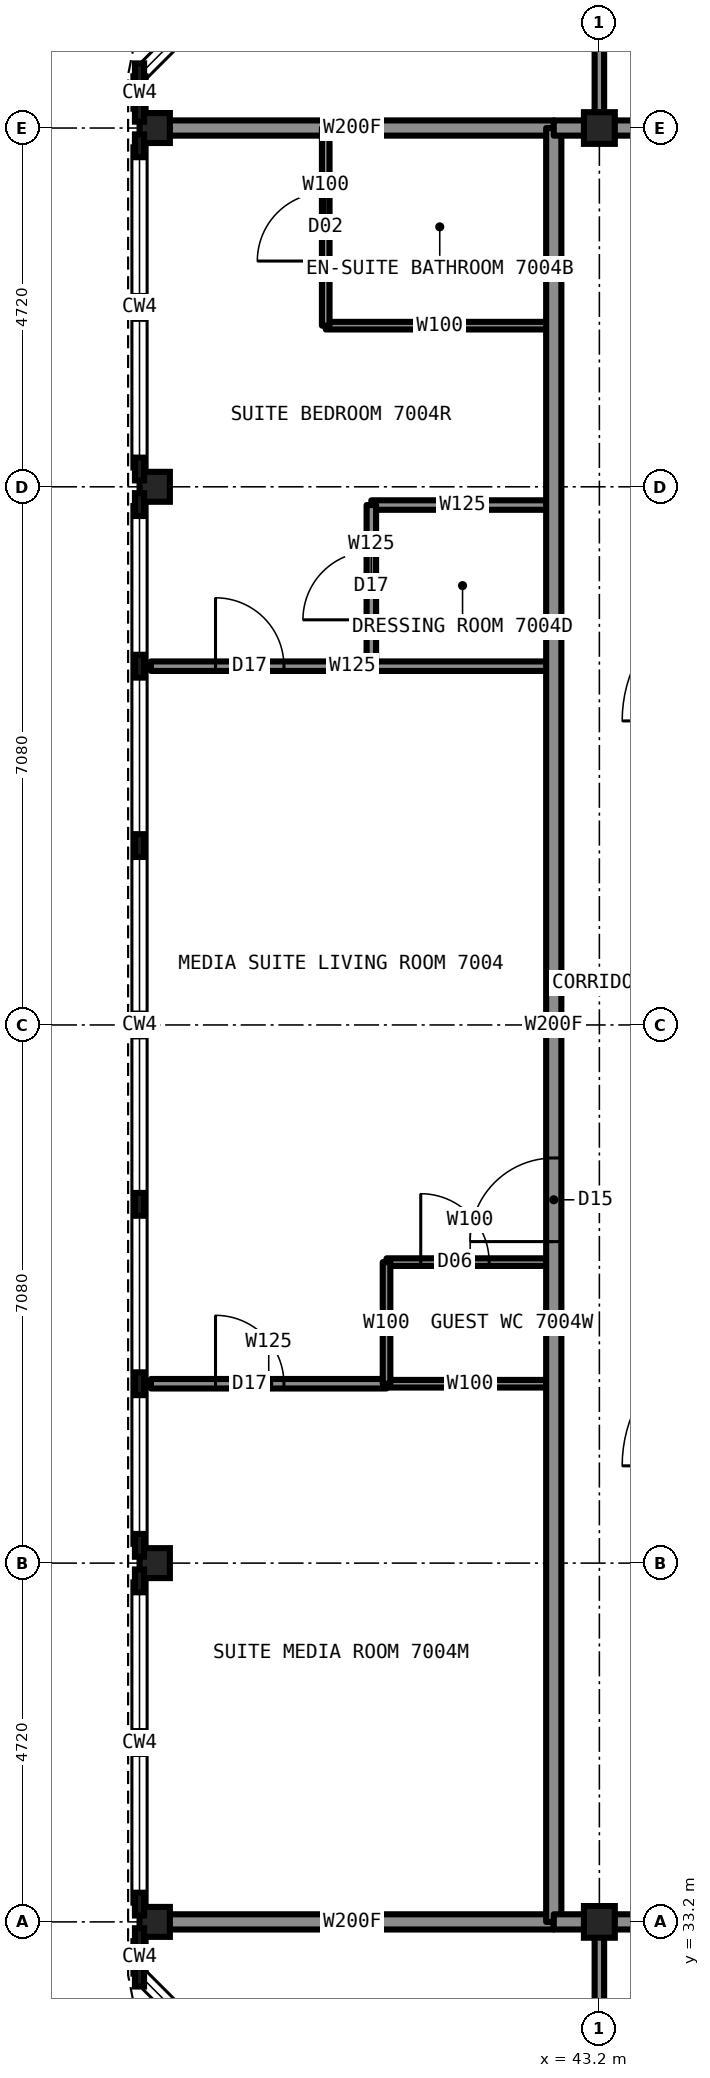
"""IFC4 building model, lengths in metres.
Left out: names, types, materials, properties, quantities, classifications, styles, units other than length and angle.
Written with IfcOpenShell. Run it as: python <this file> out.ifc"""

import sys

from ifc_helpers import new_model, si_unit, direction, frame, frame_2d, origin, origin_2d, place, context, subcontext, project, spatial, rectangle, i_section, extrude, element, fill, save


model = new_model("IFC4")
c1 = context("Model", 3, precision=1e-05, world=origin(), true_north=direction((0.0, 1.0)))
c2 = subcontext(c1, "Body", "Model", "MODEL_VIEW")
j1 = project(units=[si_unit("LENGTHUNIT", "METRE"), si_unit("PLANEANGLEUNIT", "RADIAN")], contexts=[c1])
p1 = place(None, origin())
s1 = spatial("IfcSite", under=j1, at=p1, CompositionType="ELEMENT")
p2 = place(p1, origin())
s2 = spatial("IfcBuilding", under=s1, at=p2, CompositionType="ELEMENT")
p3 = place(p2, frame((0.0, 0.0, 254.7)))
s3 = spatial("IfcBuildingStorey", under=s2, at=p3, CompositionType="ELEMENT", Elevation=254.7)
for number, where, z_axis, x_axis in (
    (1, (37.35, 33.2, 0.0), (0.0, 0.0, 1.0), (1.0, 0.0, 0.0)),
    (2, (37.35, 37.92, 0.0), (0.0, 0.0, 1.0), (1.0, 0.0, 0.0)),
    (3, (37.35, 52.08, 0.0), (0.0, 0.0, 1.0), (1.0, 0.0, 0.0)),
    (4, (37.35, 56.8, 0.0), (0.0, 0.0, 1.0), (1.0, 0.0, 0.0)),
):
    element("IfcColumn", number, at=place(p3, frame(where, z_axis=z_axis, x_axis=x_axis)), inside=s3, PredefinedType="COLUMN", context=c2, shape_type="SweptSolid", body=[
        extrude(i_section(OverallWidth=0.399, OverallDepth=0.394, WebThickness=0.023, FlangeThickness=0.037, at=origin_2d()), origin(), (0.0, 0.0, 1.0), 3.5),
    ])
for number, where, z_axis, x_axis in (
    (5, (43.2, 33.2, 0.0), (0.0, 0.0, 1.0), (1.0, 0.0, 0.0)),
    (6, (43.2, 56.8, 0.0), (0.0, 0.0, 1.0), (1.0, 0.0, 0.0)),
):
    element("IfcColumn", number, at=place(p3, frame(where, z_axis=z_axis, x_axis=x_axis)), inside=s3, PredefinedType="COLUMN", context=c2, shape_type="SweptSolid", body=[
        extrude(i_section(OverallWidth=0.406, OverallDepth=0.417, WebThickness=0.03, FlangeThickness=0.048, at=origin_2d()), origin(), (0.0, 0.0, 1.0), 3.5),
    ])
p4 = place(p3, frame((43.22, 33.2, 0.0), z_axis=(0.0, 0.0, 1.0), x_axis=(1.0, 0.0, 0.0)))
e7 = element("IfcWall", 7, at=p4, inside=s3, PredefinedType="PARTITIONING", context=c2, shape_type="SweptSolid", body=[
    extrude(rectangle(XDim=1.78, YDim=0.2, at=frame_2d((0.89, 0.0))), origin(), (0.0, 0.0, 1.0), 3.33),
])
p5 = place(p3, frame((37.3, 33.2, 0.0), z_axis=(0.0, 0.0, 1.0), x_axis=(1.0, 0.0, 0.0)))
e8 = element("IfcWall", 8, at=p5, inside=s3, PredefinedType="PARTITIONING", context=c2, shape_type="SweptSolid", body=[
    extrude(rectangle(XDim=5.3, YDim=0.2, at=frame_2d((2.65, 0.0))), origin(), (0.0, 0.0, 1.0), 2.573),
])
p6 = place(p3, frame((40.4, 41.88, 0.0), z_axis=(0.0, 0.0, 1.0), x_axis=(1.0, 0.0, 0.0)))
e9 = element("IfcWall", 9, at=p6, inside=s3, PredefinedType="PARTITIONING", context=c2, shape_type="SweptSolid", body=[
    extrude(rectangle(XDim=2.2, YDim=0.1, at=frame_2d((1.1, 0.0))), origin(), (0.0, 0.0, 1.0), 3.33),
])
p7 = place(p6, frame((0.45, 0.0, 0.0)))
e10 = element("IfcOpeningElement", 10, at=p7, cuts=e9, PredefinedType="OPENING", context=c2, shape_type="SweptSolid", body=[
    extrude(rectangle(XDim=0.9, YDim=2.1, at=frame_2d((0.45, 1.05))), frame((0.0, 0.06, 0.0), z_axis=(0.0, -1.0, 0.0), x_axis=(1.0, 0.0, 0.0)), (0.0, 0.0, 1.0), 0.12),
])
p8 = place(p3, frame((40.4, 40.28, 0.0), z_axis=(0.0, 0.0, 1.0), x_axis=(1.0, 0.0, 0.0)))
e11 = element("IfcWall", 11, at=p8, inside=s3, PredefinedType="PARTITIONING", context=c2, shape_type="SweptSolid", body=[
    extrude(rectangle(XDim=2.2, YDim=0.1, at=frame_2d((1.1, 0.0))), origin(), (0.0, 0.0, 1.0), 2.797),
])
p9 = place(p3, frame((37.3, 40.28, 0.0), z_axis=(0.0, 0.0, 1.0), x_axis=(1.0, 0.0, 0.0)))
e12 = element("IfcWall", 12, at=p9, inside=s3, PredefinedType="PARTITIONING", context=c2, shape_type="SweptSolid", body=[
    extrude(rectangle(XDim=3.1, YDim=0.125, at=frame_2d((1.55, 0.0))), origin(), (0.0, 0.0, 1.0), 2.797),
])
p10 = place(p9, frame((0.85, 0.0, 0.0)))
e13 = element("IfcOpeningElement", 13, at=p10, cuts=e12, PredefinedType="OPENING", context=c2, shape_type="SweptSolid", body=[
    extrude(rectangle(XDim=0.9, YDim=2.2, at=frame_2d((0.45, 1.1))), frame((0.0, 0.073, 0.0), z_axis=(0.0, -1.0, 0.0), x_axis=(1.0, 0.0, 0.0)), (0.0, 0.0, 1.0), 0.145),
])
p11 = place(p3, frame((43.22, 56.8, 0.0), z_axis=(0.0, 0.0, 1.0), x_axis=(1.0, 0.0, 0.0)))
e14 = element("IfcWall", 14, at=p11, inside=s3, PredefinedType="PARTITIONING", context=c2, shape_type="SweptSolid", body=[
    extrude(rectangle(XDim=1.78, YDim=0.2, at=frame_2d((0.89, 0.0))), origin(), (0.0, 0.0, 1.0), 3.33),
])
p12 = place(p3, frame((37.3, 56.8, 0.0), z_axis=(0.0, 0.0, 1.0), x_axis=(1.0, 0.0, 0.0)))
e15 = element("IfcWall", 15, at=p12, inside=s3, PredefinedType="PARTITIONING", context=c2, shape_type="SweptSolid", body=[
    extrude(rectangle(XDim=5.3, YDim=0.2, at=frame_2d((2.65, 0.0))), origin(), (0.0, 0.0, 1.0), 2.573),
])
p13 = place(p3, frame((37.3, 49.72, 0.0), z_axis=(0.0, 0.0, 1.0), x_axis=(1.0, 0.0, 0.0)))
e16 = element("IfcWall", 16, at=p13, inside=s3, PredefinedType="PARTITIONING", context=c2, shape_type="SweptSolid", body=[
    extrude(rectangle(XDim=5.3, YDim=0.125, at=frame_2d((2.65, 0.0))), origin(), (0.0, 0.0, 1.0), 2.797),
])
p14 = place(p13, frame((0.85, 0.0, 0.0)))
e17 = element("IfcOpeningElement", 17, at=p14, cuts=e16, PredefinedType="OPENING", context=c2, shape_type="SweptSolid", body=[
    extrude(rectangle(XDim=0.9, YDim=2.2, at=frame_2d((0.45, 1.1))), frame((0.0, 0.073, 0.0), z_axis=(0.0, -1.0, 0.0), x_axis=(1.0, 0.0, 0.0)), (0.0, 0.0, 1.0), 0.145),
])
p15 = place(p3, frame((40.2, 51.84, 0.0), z_axis=(0.0, 0.0, 1.0), x_axis=(1.0, 0.0, 0.0)))
e18 = element("IfcWall", 18, at=p15, inside=s3, PredefinedType="PARTITIONING", context=c2, shape_type="SweptSolid", body=[
    extrude(rectangle(XDim=2.4, YDim=0.125, at=frame_2d((1.2, 0.0))), origin(), (0.0, 0.0, 1.0), 3.33),
])
p16 = place(p3, frame((39.6, 54.2, 0.0), z_axis=(0.0, 0.0, 1.0), x_axis=(1.0, 0.0, 0.0)))
e19 = element("IfcWall", 19, at=p16, inside=s3, PredefinedType="PARTITIONING", context=c2, shape_type="SweptSolid", body=[
    extrude(rectangle(XDim=3.0, YDim=0.1, at=frame_2d((1.5, 0.0))), origin(), (0.0, 0.0, 1.0), 3.33),
])
p17 = place(p3, frame((43.2, 27.3, 0.0), z_axis=(0.0, 0.0, 1.0), x_axis=(0.0, 1.0, 0.0)))
e20 = element("IfcWall", 20, at=p17, inside=s3, PredefinedType="PARTITIONING", context=c2, shape_type="SweptSolid", body=[
    extrude(rectangle(XDim=5.9, YDim=0.125, at=frame_2d((2.95, 0.0))), origin(), (0.0, 0.0, 1.0), 2.573),
])
p18 = place(p17, frame((1.45, 0.0, 0.0)))
e21 = element("IfcOpeningElement", 21, at=p18, cuts=e20, PredefinedType="OPENING", context=c2, shape_type="SweptSolid", body=[
    extrude(rectangle(XDim=0.9, YDim=2.2, at=frame_2d((0.45, 1.1))), frame((0.0, 0.073, 0.0), z_axis=(0.0, -1.0, 0.0), x_axis=(1.0, 0.0, 0.0)), (0.0, 0.0, 1.0), 0.145),
])
p19 = place(p3, frame((43.2, 56.8, 0.0), z_axis=(0.0, 0.0, 1.0), x_axis=(0.0, 1.0, 0.0)))
e22 = element("IfcWall", 22, at=p19, inside=s3, PredefinedType="PARTITIONING", context=c2, shape_type="SweptSolid", body=[
    extrude(rectangle(XDim=5.9, YDim=0.125, at=frame_2d((2.95, 0.0))), origin(), (0.0, 0.0, 1.0), 2.573),
])
p20 = place(p19, frame((3.55, 0.0, 0.0)))
e23 = element("IfcOpeningElement", 23, at=p20, cuts=e22, PredefinedType="OPENING", context=c2, shape_type="SweptSolid", body=[
    extrude(rectangle(XDim=0.9, YDim=2.2, at=frame_2d((0.45, 1.1))), frame((0.0, 0.073, 0.0), z_axis=(0.0, -1.0, 0.0), x_axis=(1.0, 0.0, 0.0)), (0.0, 0.0, 1.0), 0.145),
])
p21 = place(p3, frame((42.6, 33.2, 0.0), z_axis=(0.0, 0.0, 1.0), x_axis=(0.0, 1.0, 0.0)))
e24 = element("IfcWall", 24, at=p21, inside=s3, PredefinedType="PARTITIONING", context=c2, shape_type="SweptSolid", body=[
    extrude(rectangle(XDim=23.6, YDim=0.2, at=frame_2d((11.8, 0.0))), origin(), (0.0, 0.0, 1.0), 3.33),
])
p22 = place(p21, frame((8.95, 0.0, 0.0)))
e25 = element("IfcOpeningElement", 25, at=p22, cuts=e24, PredefinedType="OPENING", context=c2, shape_type="SweptSolid", body=[
    extrude(rectangle(XDim=1.1, YDim=2.2, at=frame_2d((0.55, 1.1))), frame((0.0, 0.11, 0.0), z_axis=(0.0, -1.0, 0.0), x_axis=(1.0, 0.0, 0.0)), (0.0, 0.0, 1.0), 0.22),
])
p23 = place(p3, frame((40.4, 40.28, 0.0), z_axis=(0.0, 0.0, 1.0), x_axis=(0.0, 1.0, 0.0)))
e26 = element("IfcWall", 26, at=p23, inside=s3, PredefinedType="PARTITIONING", context=c2, shape_type="SweptSolid", body=[
    extrude(rectangle(XDim=1.6, YDim=0.1, at=frame_2d((0.8, 0.0))), origin(), (0.0, 0.0, 1.0), 3.33),
])
p24 = place(p3, frame((40.2, 49.72, 0.0), z_axis=(0.0, 0.0, 1.0), x_axis=(0.0, 1.0, 0.0)))
e27 = element("IfcWall", 27, at=p24, inside=s3, PredefinedType="PARTITIONING", context=c2, shape_type="SweptSolid", body=[
    extrude(rectangle(XDim=2.12, YDim=0.125, at=frame_2d((1.06, 0.0))), origin(), (0.0, 0.0, 1.0), 3.33),
])
p25 = place(p24, frame((0.61, 0.0, 0.0)))
e28 = element("IfcOpeningElement", 28, at=p25, cuts=e27, PredefinedType="OPENING", context=c2, shape_type="SweptSolid", body=[
    extrude(rectangle(XDim=0.9, YDim=2.2, at=frame_2d((0.45, 1.1))), frame((0.0, 0.073, 0.0), z_axis=(0.0, -1.0, 0.0), x_axis=(1.0, 0.0, 0.0)), (0.0, 0.0, 1.0), 0.145),
])
p26 = place(p3, frame((39.6, 54.2, 0.0), z_axis=(0.0, 0.0, 1.0), x_axis=(0.0, 1.0, 0.0)))
e29 = element("IfcWall", 29, at=p26, inside=s3, PredefinedType="PARTITIONING", context=c2, shape_type="SweptSolid", body=[
    extrude(rectangle(XDim=2.6, YDim=0.1, at=frame_2d((1.3, 0.0))), origin(), (0.0, 0.0, 1.0), 3.33),
])
p27 = place(p26, frame((0.85, 0.0, 0.0)))
e30 = element("IfcOpeningElement", 30, at=p27, cuts=e29, PredefinedType="OPENING", context=c2, shape_type="SweptSolid", body=[
    extrude(rectangle(XDim=0.9, YDim=2.1, at=frame_2d((0.45, 1.05))), frame((0.0, 0.06, 0.0), z_axis=(0.0, -1.0, 0.0), x_axis=(1.0, 0.0, 0.0)), (0.0, 0.0, 1.0), 0.12),
])
for number, where, z_axis, x_axis in (
    (31, (42.6, 33.2, 0.0), (0.0, 0.0, 1.0), (1.0, 0.0, 0.0)),
    (32, (42.6, 56.8, 0.0), (0.0, 0.0, 1.0), (1.0, 0.0, 0.0)),
):
    element("IfcWall", number, at=place(p3, frame(where, z_axis=z_axis, x_axis=x_axis)), inside=s3, PredefinedType="PARTITIONING", context=c2, shape_type="SweptSolid", body=[
        extrude(rectangle(XDim=0.62, YDim=0.2, at=frame_2d((0.31, 0.0))), origin(), (0.0, 0.0, 1.0), 2.573),
    ])
p28 = place(p22, origin())
e33 = element("IfcDoor", 33, at=p28, inside=s3, OperationType="SINGLE_SWING_LEFT", PredefinedType="DOOR", context=c2, shape_type="SweptSolid", body=[
    extrude(rectangle(XDim=1.1, YDim=2.2, at=frame_2d((0.55, 1.1))), frame((0.0, 0.025, 0.0), z_axis=(0.0, -1.0, 0.0), x_axis=(1.0, 0.0, 0.0)), (0.0, 0.0, 1.0), 0.05),
])
fill(e25, e33)
p29 = place(p27, origin())
e34 = element("IfcDoor", 34, at=p29, inside=s3, OperationType="SINGLE_SWING_RIGHT", PredefinedType="DOOR", context=c2, shape_type="SweptSolid", body=[
    extrude(rectangle(XDim=0.9, YDim=2.1, at=frame_2d((0.45, 1.05))), frame((0.0, 0.025, 0.0), z_axis=(0.0, -1.0, 0.0), x_axis=(1.0, 0.0, 0.0)), (0.0, 0.0, 1.0), 0.05),
])
fill(e30, e34)
p30 = place(p25, origin())
e35 = element("IfcDoor", 35, at=p30, inside=s3, OperationType="SINGLE_SWING_LEFT", PredefinedType="DOOR", context=c2, shape_type="SweptSolid", body=[
    extrude(rectangle(XDim=0.9, YDim=2.2, at=frame_2d((0.45, 1.1))), frame((0.0, 0.025, 0.0), z_axis=(0.0, -1.0, 0.0), x_axis=(1.0, 0.0, 0.0)), (0.0, 0.0, 1.0), 0.05),
])
fill(e28, e35)
p31 = place(p10, origin())
e36 = element("IfcDoor", 36, at=p31, inside=s3, OperationType="SINGLE_SWING_LEFT", PredefinedType="DOOR", context=c2, shape_type="SweptSolid", body=[
    extrude(rectangle(XDim=0.9, YDim=2.2, at=frame_2d((0.45, 1.1))), frame((0.0, 0.025, 0.0), z_axis=(0.0, -1.0, 0.0), x_axis=(1.0, 0.0, 0.0)), (0.0, 0.0, 1.0), 0.05),
])
fill(e13, e36)
p32 = place(p14, origin())
e37 = element("IfcDoor", 37, at=p32, inside=s3, OperationType="SINGLE_SWING_LEFT", PredefinedType="DOOR", context=c2, shape_type="SweptSolid", body=[
    extrude(rectangle(XDim=0.9, YDim=2.2, at=frame_2d((0.45, 1.1))), frame((0.0, 0.025, 0.0), z_axis=(0.0, -1.0, 0.0), x_axis=(1.0, 0.0, 0.0)), (0.0, 0.0, 1.0), 0.05),
])
fill(e17, e37)
p33 = place(p7, origin())
e38 = element("IfcDoor", 38, at=p33, inside=s3, OperationType="SINGLE_SWING_LEFT", PredefinedType="DOOR", context=c2, shape_type="SweptSolid", body=[
    extrude(rectangle(XDim=0.9, YDim=2.1, at=frame_2d((0.45, 1.05))), frame((0.0, 0.025, 0.0), z_axis=(0.0, -1.0, 0.0), x_axis=(1.0, 0.0, 0.0)), (0.0, 0.0, 1.0), 0.05),
])
fill(e10, e38)
save(model, sys.argv[1])
